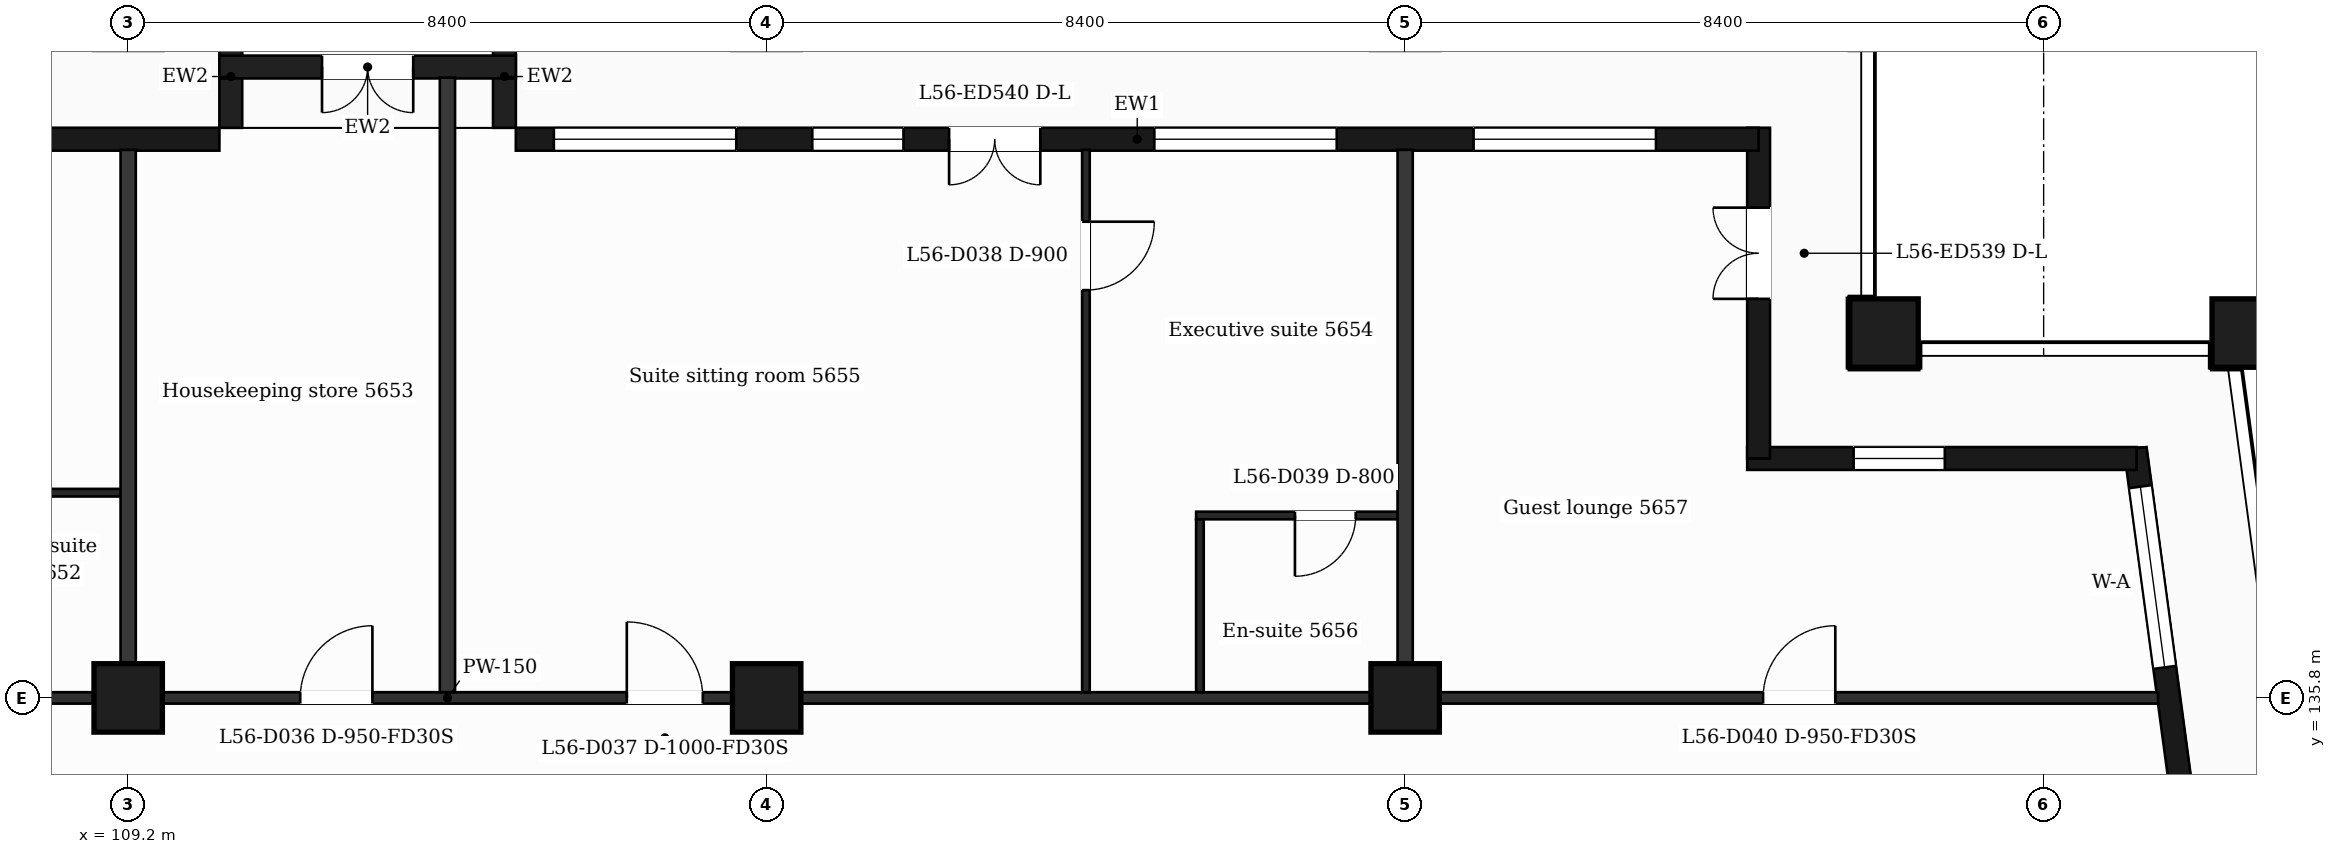
"""IFC4 building model, lengths in metres.
Left out: names, types, materials, properties, quantities, classifications, styles, units other than length and angle.
Written with IfcOpenShell. Run it as: python <this file> out.ifc"""

import sys

from ifc_helpers import new_model, si_unit, direction, frame, frame_2d, origin, origin_2d, place, context, subcontext, project, spatial, rectangle, extrude, element, fill, save


model = new_model("IFC4")
c1 = context("Model", 3, precision=1e-05, world=origin(), true_north=direction((0.0, 1.0)))
c2 = subcontext(c1, "Body", "Model", "MODEL_VIEW")
j1 = project(units=[si_unit("LENGTHUNIT", "METRE"), si_unit("PLANEANGLEUNIT", "RADIAN")], contexts=[c1])
p1 = place(None, origin())
s1 = spatial("IfcSite", under=j1, at=p1, CompositionType="ELEMENT")
p2 = place(p1, origin())
s2 = spatial("IfcBuilding", under=s1, at=p2, CompositionType="ELEMENT")
p3 = place(p2, frame((0.0, 0.0, 231.8)))
s3 = spatial("IfcBuildingStorey", under=s2, at=p3, CompositionType="ELEMENT", Elevation=231.8)
for number, where, z_axis, x_axis in (
    (1, (132.3, 140.6, 0.0), (0.0, 0.0, 1.0), (1.0, 0.0, 0.0)),
    (2, (137.065, 140.6, 0.0), (0.0, 0.0, 1.0), (1.0, 0.0, 0.0)),
    (3, (109.2, 135.8, 0.0), (0.0, 0.0, 1.0), (1.0, 0.0, 0.0)),
    (4, (117.6, 135.8, 0.0), (0.0, 0.0, 1.0), (1.0, 0.0, 0.0)),
    (5, (126.0, 135.8, 0.0), (0.0, 0.0, 1.0), (1.0, 0.0, 0.0)),
):
    element("IfcColumn", number, at=place(p3, frame(where, z_axis=z_axis, x_axis=x_axis)), inside=s3, PredefinedType="COLUMN", context=c2, shape_type="SweptSolid", body=[
        extrude(rectangle(XDim=0.9, YDim=0.9, at=origin_2d()), origin(), (0.0, 0.0, 1.0), 3.7),
    ])
p4 = place(p3, frame((136.504, 132.4, 0.0), z_axis=(0.0, 0.0, 1.0), x_axis=(-0.133399697462, 0.99106231929, 0.0)))
e6 = element("IfcWall", 6, at=p4, inside=s3, PredefinedType="SOLIDWALL", context=c2, shape_type="SweptSolid", body=[
    extrude(rectangle(XDim=6.74, YDim=0.3, at=frame_2d((3.37, 0.0))), origin(), (0.0, 0.0, 1.0), 3.38),
])
p5 = place(p4, frame((1.115, 0.0, 0.0)))
e7 = element("IfcOpeningElement", 7, at=p5, cuts=e6, PredefinedType="OPENING", context=c2, shape_type="SweptSolid", body=[
    extrude(rectangle(XDim=1.2, YDim=2.4, at=frame_2d((0.6, 1.2))), frame((0.0, 0.16, 0.0), z_axis=(0.0, -1.0, 0.0), x_axis=(1.0, 0.0, 0.0)), (0.0, 0.0, 1.0), 0.32),
])
p6 = place(p4, frame((3.835, 0.0, 0.9)))
e8 = element("IfcOpeningElement", 8, at=p6, cuts=e6, PredefinedType="OPENING", context=c2, shape_type="SweptSolid", body=[
    extrude(rectangle(XDim=2.4, YDim=2.1, at=frame_2d((1.2, 1.05))), frame((0.0, 0.16, 0.0), z_axis=(0.0, -1.0, 0.0), x_axis=(1.0, 0.0, 0.0)), (0.0, 0.0, 1.0), 0.32),
])
p7 = place(p3, frame((135.623, 138.95, 0.0), z_axis=(0.0, 0.0, 1.0), x_axis=(-1.0, 0.0, 0.0)))
e9 = element("IfcWall", 9, at=p7, inside=s3, PredefinedType="SOLIDWALL", context=c2, shape_type="SweptSolid", body=[
    extrude(rectangle(XDim=5.123, YDim=0.3, at=frame_2d((2.561, 0.0))), origin(), (0.0, 0.0, 1.0), 3.38),
])
p8 = place(p7, frame((2.523, 0.0, 0.9)))
e10 = element("IfcOpeningElement", 10, at=p8, cuts=e9, PredefinedType="OPENING", context=c2, shape_type="SweptSolid", body=[
    extrude(rectangle(XDim=1.2, YDim=2.1, at=frame_2d((0.6, 1.05))), frame((0.0, 0.16, 0.0), z_axis=(0.0, -1.0, 0.0), x_axis=(1.0, 0.0, 0.0)), (0.0, 0.0, 1.0), 0.32),
])
p9 = place(p3, frame((130.65, 138.95, 0.0), z_axis=(0.0, 0.0, 1.0), x_axis=(0.0, 1.0, 0.0)))
e11 = element("IfcWall", 11, at=p9, inside=s3, PredefinedType="SOLIDWALL", context=c2, shape_type="SweptSolid", body=[
    extrude(rectangle(XDim=4.35, YDim=0.3, at=frame_2d((2.175, 0.0))), origin(), (0.0, 0.0, 1.0), 3.38),
])
p10 = place(p9, frame((2.1, 0.0, 0.0)))
e12 = element("IfcOpeningElement", 12, at=p10, cuts=e11, PredefinedType="OPENING", context=c2, shape_type="SweptSolid", body=[
    extrude(rectangle(XDim=1.2, YDim=2.4, at=frame_2d((0.6, 1.2))), frame((0.0, 0.16, 0.0), z_axis=(0.0, -1.0, 0.0), x_axis=(1.0, 0.0, 0.0)), (0.0, 0.0, 1.0), 0.32),
])
p11 = place(p3, frame((130.65, 143.15, 0.0), z_axis=(0.0, 0.0, 1.0), x_axis=(-1.0, 0.0, 0.0)))
e13 = element("IfcWall", 13, at=p11, inside=s3, PredefinedType="SOLIDWALL", context=c2, shape_type="SweptSolid", body=[
    extrude(rectangle(XDim=16.35, YDim=0.3, at=frame_2d((8.175, 0.0))), origin(), (0.0, 0.0, 1.0), 3.38),
])
p12 = place(p11, frame((1.35, 0.0, 0.9)))
e14 = element("IfcOpeningElement", 14, at=p12, cuts=e13, PredefinedType="OPENING", context=c2, shape_type="SweptSolid", body=[
    extrude(rectangle(XDim=2.4, YDim=2.1, at=frame_2d((1.2, 1.05))), frame((0.0, 0.16, 0.0), z_axis=(0.0, -1.0, 0.0), x_axis=(1.0, 0.0, 0.0)), (0.0, 0.0, 1.0), 0.32),
])
p13 = place(p11, frame((5.55, 0.0, 0.9)))
e15 = element("IfcOpeningElement", 15, at=p13, cuts=e13, PredefinedType="OPENING", context=c2, shape_type="SweptSolid", body=[
    extrude(rectangle(XDim=2.4, YDim=2.1, at=frame_2d((1.2, 1.05))), frame((0.0, 0.16, 0.0), z_axis=(0.0, -1.0, 0.0), x_axis=(1.0, 0.0, 0.0)), (0.0, 0.0, 1.0), 0.32),
])
p14 = place(p11, frame((9.45, 0.0, 0.0)))
e16 = element("IfcOpeningElement", 16, at=p14, cuts=e13, PredefinedType="OPENING", context=c2, shape_type="SweptSolid", body=[
    extrude(rectangle(XDim=1.2, YDim=2.4, at=frame_2d((0.6, 1.2))), frame((0.0, 0.16, 0.0), z_axis=(0.0, -1.0, 0.0), x_axis=(1.0, 0.0, 0.0)), (0.0, 0.0, 1.0), 0.32),
])
p15 = place(p11, frame((11.25, 0.0, 0.9)))
e17 = element("IfcOpeningElement", 17, at=p15, cuts=e13, PredefinedType="OPENING", context=c2, shape_type="SweptSolid", body=[
    extrude(rectangle(XDim=1.2, YDim=2.1, at=frame_2d((0.6, 1.05))), frame((0.0, 0.16, 0.0), z_axis=(0.0, -1.0, 0.0), x_axis=(1.0, 0.0, 0.0)), (0.0, 0.0, 1.0), 0.32),
])
p16 = place(p11, frame((13.45, 0.0, 0.9)))
e18 = element("IfcOpeningElement", 18, at=p16, cuts=e13, PredefinedType="OPENING", context=c2, shape_type="SweptSolid", body=[
    extrude(rectangle(XDim=2.4, YDim=2.1, at=frame_2d((1.2, 1.05))), frame((0.0, 0.16, 0.0), z_axis=(0.0, -1.0, 0.0), x_axis=(1.0, 0.0, 0.0)), (0.0, 0.0, 1.0), 0.32),
])
p17 = place(p3, frame((110.4, 143.15, 0.0), z_axis=(0.0, 0.0, 1.0), x_axis=(-1.0, 0.0, 0.0)))
e19 = element("IfcWall", 19, at=p17, inside=s3, PredefinedType="SOLIDWALL", context=c2, shape_type="SweptSolid", body=[
    extrude(rectangle(XDim=14.4, YDim=0.3, at=frame_2d((7.2, 0.0))), origin(), (0.0, 0.0, 1.0), 3.38),
])
p18 = place(p17, frame((2.7, 0.0, 0.9)))
e20 = element("IfcOpeningElement", 20, at=p18, cuts=e19, PredefinedType="OPENING", context=c2, shape_type="SweptSolid", body=[
    extrude(rectangle(XDim=1.2, YDim=2.1, at=frame_2d((0.6, 1.05))), frame((0.0, 0.16, 0.0), z_axis=(0.0, -1.0, 0.0), x_axis=(1.0, 0.0, 0.0)), (0.0, 0.0, 1.0), 0.32),
])
p19 = place(p17, frame((6.9, 0.0, 0.0)))
e21 = element("IfcOpeningElement", 21, at=p19, cuts=e19, PredefinedType="OPENING", context=c2, shape_type="SweptSolid", body=[
    extrude(rectangle(XDim=1.2, YDim=2.4, at=frame_2d((0.6, 1.2))), frame((0.0, 0.16, 0.0), z_axis=(0.0, -1.0, 0.0), x_axis=(1.0, 0.0, 0.0)), (0.0, 0.0, 1.0), 0.32),
])
p20 = place(p17, frame((10.5, 0.0, 0.9)))
e22 = element("IfcOpeningElement", 22, at=p20, cuts=e19, PredefinedType="OPENING", context=c2, shape_type="SweptSolid", body=[
    extrude(rectangle(XDim=2.4, YDim=2.1, at=frame_2d((1.2, 1.05))), frame((0.0, 0.16, 0.0), z_axis=(0.0, -1.0, 0.0), x_axis=(1.0, 0.0, 0.0)), (0.0, 0.0, 1.0), 0.32),
])
for number, where, z_axis, x_axis in (
    (23, (114.15, 143.3, 0.0), (0.0, 0.0, 1.0), (0.0, 1.0, 0.0)),
    (24, (110.55, 143.3, 0.0), (0.0, 0.0, 1.0), (0.0, 1.0, 0.0)),
):
    element("IfcWall", number, at=place(p3, frame(where, z_axis=z_axis, x_axis=x_axis)), inside=s3, PredefinedType="SOLIDWALL", context=c2, shape_type="SweptSolid", body=[
        extrude(rectangle(XDim=1.35, YDim=0.3, at=frame_2d((0.675, 0.0))), origin(), (0.0, 0.0, 1.0), 3.38),
    ])
p21 = place(p3, frame((114.3, 144.1, 0.0), z_axis=(0.0, 0.0, 1.0), x_axis=(-1.0, 0.0, 0.0)))
e25 = element("IfcWall", 25, at=p21, inside=s3, PredefinedType="SOLIDWALL", context=c2, shape_type="SweptSolid", body=[
    extrude(rectangle(XDim=3.9, YDim=0.3, at=frame_2d((1.95, 0.0))), origin(), (0.0, 0.0, 1.0), 3.38),
])
p22 = place(p21, frame((1.35, 0.0, 0.0)))
e26 = element("IfcOpeningElement", 26, at=p22, cuts=e25, PredefinedType="OPENING", context=c2, shape_type="SweptSolid", body=[
    extrude(rectangle(XDim=1.2, YDim=2.4, at=frame_2d((0.6, 1.2))), frame((0.0, 0.16, 0.0), z_axis=(0.0, -1.0, 0.0), x_axis=(1.0, 0.0, 0.0)), (0.0, 0.0, 1.0), 0.32),
])
p23 = place(p3, frame((90.895, 135.8, 0.0), z_axis=(0.0, 0.0, 1.0), x_axis=(1.0, 0.0, 0.0)))
e27 = element("IfcWall", 27, at=p23, inside=s3, PredefinedType="PARTITIONING", context=c2, shape_type="SweptSolid", body=[
    extrude(rectangle(XDim=45.011, YDim=0.15, at=frame_2d((22.505, 0.0))), origin(), (0.0, 0.0, 1.0), 3.38),
])
p24 = place(p23, frame((7.675, 0.0, 0.0)))
e28 = element("IfcOpeningElement", 28, at=p24, cuts=e27, PredefinedType="OPENING", context=c2, shape_type="SweptSolid", body=[
    extrude(rectangle(XDim=1.0, YDim=2.1, at=frame_2d((0.5, 1.05))), frame((0.0, 0.085, 0.0), z_axis=(0.0, -1.0, 0.0), x_axis=(1.0, 0.0, 0.0)), (0.0, 0.0, 1.0), 0.17),
])
p25 = place(p23, frame((12.58, 0.0, 0.0)))
e29 = element("IfcOpeningElement", 29, at=p25, cuts=e27, PredefinedType="OPENING", context=c2, shape_type="SweptSolid", body=[
    extrude(rectangle(XDim=0.95, YDim=2.1, at=frame_2d((0.475, 1.05))), frame((0.0, 0.085, 0.0), z_axis=(0.0, -1.0, 0.0), x_axis=(1.0, 0.0, 0.0)), (0.0, 0.0, 1.0), 0.17),
])
p26 = place(p23, frame((20.568, 0.0, 0.0)))
e30 = element("IfcOpeningElement", 30, at=p26, cuts=e27, PredefinedType="OPENING", context=c2, shape_type="SweptSolid", body=[
    extrude(rectangle(XDim=0.95, YDim=2.1, at=frame_2d((0.475, 1.05))), frame((0.0, 0.085, 0.0), z_axis=(0.0, -1.0, 0.0), x_axis=(1.0, 0.0, 0.0)), (0.0, 0.0, 1.0), 0.17),
])
p27 = place(p23, frame((24.865, 0.0, 0.0)))
e31 = element("IfcOpeningElement", 31, at=p27, cuts=e27, PredefinedType="OPENING", context=c2, shape_type="SweptSolid", body=[
    extrude(rectangle(XDim=1.0, YDim=2.1, at=frame_2d((0.5, 1.05))), frame((0.0, 0.085, 0.0), z_axis=(0.0, -1.0, 0.0), x_axis=(1.0, 0.0, 0.0)), (0.0, 0.0, 1.0), 0.17),
])
p28 = place(p23, frame((39.814, 0.0, 0.0)))
e32 = element("IfcOpeningElement", 32, at=p28, cuts=e27, PredefinedType="OPENING", context=c2, shape_type="SweptSolid", body=[
    extrude(rectangle(XDim=0.95, YDim=2.1, at=frame_2d((0.475, 1.05))), frame((0.0, 0.085, 0.0), z_axis=(0.0, -1.0, 0.0), x_axis=(1.0, 0.0, 0.0)), (0.0, 0.0, 1.0), 0.17),
])
p29 = place(p3, frame((123.25, 138.2, 0.0), z_axis=(0.0, 0.0, 1.0), x_axis=(1.0, 0.0, 0.0)))
e33 = element("IfcWall", 33, at=p29, inside=s3, PredefinedType="PARTITIONING", context=c2, shape_type="SweptSolid", body=[
    extrude(rectangle(XDim=2.75, YDim=0.1, at=frame_2d((1.375, 0.0))), origin(), (0.0, 0.0, 1.0), 3.38),
])
p30 = place(p29, frame((1.3, 0.0, 0.0)))
e34 = element("IfcOpeningElement", 34, at=p30, cuts=e33, PredefinedType="OPENING", context=c2, shape_type="SweptSolid", body=[
    extrude(rectangle(XDim=0.8, YDim=2.1, at=frame_2d((0.4, 1.05))), frame((0.0, 0.06, 0.0), z_axis=(0.0, -1.0, 0.0), x_axis=(1.0, 0.0, 0.0)), (0.0, 0.0, 1.0), 0.12),
])
p31 = place(p3, frame((107.05, 138.5, 0.0), z_axis=(0.0, 0.0, 1.0), x_axis=(1.0, 0.0, 0.0)))
e35 = element("IfcWall", 35, at=p31, inside=s3, PredefinedType="PARTITIONING", context=c2, shape_type="SweptSolid", body=[
    extrude(rectangle(XDim=2.15, YDim=0.1, at=frame_2d((1.075, 0.0))), origin(), (0.0, 0.0, 1.0), 3.38),
])
p32 = place(p3, frame((109.2, 135.875, 0.0), z_axis=(0.0, 0.0, 1.0), x_axis=(0.0, 1.0, 0.0)))
e36 = element("IfcWall", 36, at=p32, inside=s3, PredefinedType="PARTITIONING", context=c2, shape_type="SweptSolid", body=[
    extrude(rectangle(XDim=7.135, YDim=0.2, at=frame_2d((3.567, 0.0))), origin(), (0.0, 0.0, 1.0), 3.38),
])
p33 = place(p3, frame((113.4, 135.875, 0.0), z_axis=(0.0, 0.0, 1.0), x_axis=(0.0, 1.0, 0.0)))
e37 = element("IfcWall", 37, at=p33, inside=s3, PredefinedType="PARTITIONING", context=c2, shape_type="SweptSolid", body=[
    extrude(rectangle(XDim=8.085, YDim=0.2, at=frame_2d((4.042, 0.0))), origin(), (0.0, 0.0, 1.0), 3.38),
])
p34 = place(p3, frame((121.8, 135.875, 0.0), z_axis=(0.0, 0.0, 1.0), x_axis=(0.0, 1.0, 0.0)))
e38 = element("IfcWall", 38, at=p34, inside=s3, PredefinedType="PARTITIONING", context=c2, shape_type="SweptSolid", body=[
    extrude(rectangle(XDim=7.135, YDim=0.1, at=frame_2d((3.567, 0.0))), origin(), (0.0, 0.0, 1.0), 3.38),
])
p35 = place(p34, frame((5.29, 0.0, 0.0)))
e39 = element("IfcOpeningElement", 39, at=p35, cuts=e38, PredefinedType="OPENING", context=c2, shape_type="SweptSolid", body=[
    extrude(rectangle(XDim=0.9, YDim=2.1, at=frame_2d((0.45, 1.05))), frame((0.0, 0.06, 0.0), z_axis=(0.0, -1.0, 0.0), x_axis=(1.0, 0.0, 0.0)), (0.0, 0.0, 1.0), 0.12),
])
p36 = place(p3, frame((123.3, 135.875, 0.0), z_axis=(0.0, 0.0, 1.0), x_axis=(0.0, 1.0, 0.0)))
e40 = element("IfcWall", 40, at=p36, inside=s3, PredefinedType="PARTITIONING", context=c2, shape_type="SweptSolid", body=[
    extrude(rectangle(XDim=2.275, YDim=0.1, at=frame_2d((1.137, 0.0))), origin(), (0.0, 0.0, 1.0), 3.38),
])
p37 = place(p3, frame((126.0, 135.875, 0.0), z_axis=(0.0, 0.0, 1.0), x_axis=(0.0, 1.0, 0.0)))
e41 = element("IfcWall", 41, at=p37, inside=s3, PredefinedType="PARTITIONING", context=c2, shape_type="SweptSolid", body=[
    extrude(rectangle(XDim=7.135, YDim=0.2, at=frame_2d((3.567, 0.0))), origin(), (0.0, 0.0, 1.0), 3.38),
])
p38 = place(p6, origin())
e42 = element("IfcWindow", 42, at=p38, inside=s3, PartitioningType="SINGLE_PANEL", PredefinedType="WINDOW", context=c2, shape_type="SweptSolid", body=[
    extrude(rectangle(XDim=2.4, YDim=2.1, at=frame_2d((1.2, 1.05))), frame((0.0, 0.03, 0.0), z_axis=(0.0, -1.0, 0.0), x_axis=(1.0, 0.0, 0.0)), (0.0, 0.0, 1.0), 0.06),
])
fill(e8, e42)
p39 = place(p8, origin())
e43 = element("IfcWindow", 43, at=p39, inside=s3, PartitioningType="SINGLE_PANEL", PredefinedType="WINDOW", context=c2, shape_type="SweptSolid", body=[
    extrude(rectangle(XDim=1.2, YDim=2.1, at=frame_2d((0.6, 1.05))), frame((0.0, 0.03, 0.0), z_axis=(0.0, -1.0, 0.0), x_axis=(1.0, 0.0, 0.0)), (0.0, 0.0, 1.0), 0.06),
])
fill(e10, e43)
p40 = place(p10, origin())
e44 = element("IfcDoor", 44, at=p40, inside=s3, OperationType="DOUBLE_DOOR_SINGLE_SWING", PredefinedType="DOOR", context=c2, shape_type="SweptSolid", body=[
    extrude(rectangle(XDim=1.2, YDim=2.4, at=frame_2d((0.6, 1.2))), frame((0.0, 0.025, 0.0), z_axis=(0.0, -1.0, 0.0), x_axis=(1.0, 0.0, 0.0)), (0.0, 0.0, 1.0), 0.05),
])
fill(e12, e44)
p41 = place(p12, origin())
e45 = element("IfcWindow", 45, at=p41, inside=s3, PartitioningType="SINGLE_PANEL", PredefinedType="WINDOW", context=c2, shape_type="SweptSolid", body=[
    extrude(rectangle(XDim=2.4, YDim=2.1, at=frame_2d((1.2, 1.05))), frame((0.0, 0.03, 0.0), z_axis=(0.0, -1.0, 0.0), x_axis=(1.0, 0.0, 0.0)), (0.0, 0.0, 1.0), 0.06),
])
fill(e14, e45)
p42 = place(p13, origin())
e46 = element("IfcWindow", 46, at=p42, inside=s3, PartitioningType="SINGLE_PANEL", PredefinedType="WINDOW", context=c2, shape_type="SweptSolid", body=[
    extrude(rectangle(XDim=2.4, YDim=2.1, at=frame_2d((1.2, 1.05))), frame((0.0, 0.03, 0.0), z_axis=(0.0, -1.0, 0.0), x_axis=(1.0, 0.0, 0.0)), (0.0, 0.0, 1.0), 0.06),
])
fill(e15, e46)
p43 = place(p14, origin())
e47 = element("IfcDoor", 47, at=p43, inside=s3, OperationType="DOUBLE_DOOR_SINGLE_SWING", PredefinedType="DOOR", context=c2, shape_type="SweptSolid", body=[
    extrude(rectangle(XDim=1.2, YDim=2.4, at=frame_2d((0.6, 1.2))), frame((0.0, 0.025, 0.0), z_axis=(0.0, -1.0, 0.0), x_axis=(1.0, 0.0, 0.0)), (0.0, 0.0, 1.0), 0.05),
])
fill(e16, e47)
p44 = place(p15, origin())
e48 = element("IfcWindow", 48, at=p44, inside=s3, PartitioningType="SINGLE_PANEL", PredefinedType="WINDOW", context=c2, shape_type="SweptSolid", body=[
    extrude(rectangle(XDim=1.2, YDim=2.1, at=frame_2d((0.6, 1.05))), frame((0.0, 0.03, 0.0), z_axis=(0.0, -1.0, 0.0), x_axis=(1.0, 0.0, 0.0)), (0.0, 0.0, 1.0), 0.06),
])
fill(e17, e48)
p45 = place(p16, origin())
e49 = element("IfcWindow", 49, at=p45, inside=s3, PartitioningType="SINGLE_PANEL", PredefinedType="WINDOW", context=c2, shape_type="SweptSolid", body=[
    extrude(rectangle(XDim=2.4, YDim=2.1, at=frame_2d((1.2, 1.05))), frame((0.0, 0.03, 0.0), z_axis=(0.0, -1.0, 0.0), x_axis=(1.0, 0.0, 0.0)), (0.0, 0.0, 1.0), 0.06),
])
fill(e18, e49)
p46 = place(p22, origin())
e50 = element("IfcDoor", 50, at=p46, inside=s3, OperationType="DOUBLE_DOOR_SINGLE_SWING", PredefinedType="DOOR", context=c2, shape_type="SweptSolid", body=[
    extrude(rectangle(XDim=1.2, YDim=2.4, at=frame_2d((0.6, 1.2))), frame((0.0, 0.025, 0.0), z_axis=(0.0, -1.0, 0.0), x_axis=(1.0, 0.0, 0.0)), (0.0, 0.0, 1.0), 0.05),
])
fill(e26, e50)
p47 = place(p26, origin())
e51 = element("IfcDoor", 51, at=p47, inside=s3, OperationType="SINGLE_SWING_RIGHT", PredefinedType="DOOR", context=c2, shape_type="SweptSolid", body=[
    extrude(rectangle(XDim=0.95, YDim=2.1, at=frame_2d((0.475, 1.05))), frame((0.0, 0.025, 0.0), z_axis=(0.0, -1.0, 0.0), x_axis=(1.0, 0.0, 0.0)), (0.0, 0.0, 1.0), 0.05),
])
fill(e30, e51)
p48 = place(p27, origin())
e52 = element("IfcDoor", 52, at=p48, inside=s3, OperationType="SINGLE_SWING_LEFT", PredefinedType="DOOR", context=c2, shape_type="SweptSolid", body=[
    extrude(rectangle(XDim=1.0, YDim=2.1, at=frame_2d((0.5, 1.05))), frame((0.0, 0.025, 0.0), z_axis=(0.0, -1.0, 0.0), x_axis=(1.0, 0.0, 0.0)), (0.0, 0.0, 1.0), 0.05),
])
fill(e31, e52)
p49 = place(p35, origin())
e53 = element("IfcDoor", 53, at=p49, inside=s3, OperationType="SINGLE_SWING_RIGHT", PredefinedType="DOOR", context=c2, shape_type="SweptSolid", body=[
    extrude(rectangle(XDim=0.9, YDim=2.1, at=frame_2d((0.45, 1.05))), frame((0.0, 0.025, 0.0), z_axis=(0.0, -1.0, 0.0), x_axis=(1.0, 0.0, 0.0)), (0.0, 0.0, 1.0), 0.05),
])
fill(e39, e53)
p50 = place(p30, origin())
e54 = element("IfcDoor", 54, at=p50, inside=s3, OperationType="SINGLE_SWING_LEFT", PredefinedType="DOOR", context=c2, shape_type="SweptSolid", body=[
    extrude(rectangle(XDim=0.8, YDim=2.1, at=frame_2d((0.4, 1.05))), frame((0.0, 0.025, 0.0), z_axis=(0.0, -1.0, 0.0), x_axis=(1.0, 0.0, 0.0)), (0.0, 0.0, 1.0), 0.05),
])
fill(e34, e54)
p51 = place(p28, origin())
e55 = element("IfcDoor", 55, at=p51, inside=s3, OperationType="SINGLE_SWING_RIGHT", PredefinedType="DOOR", context=c2, shape_type="SweptSolid", body=[
    extrude(rectangle(XDim=0.95, YDim=2.1, at=frame_2d((0.475, 1.05))), frame((0.0, 0.025, 0.0), z_axis=(0.0, -1.0, 0.0), x_axis=(1.0, 0.0, 0.0)), (0.0, 0.0, 1.0), 0.05),
])
fill(e32, e55)
save(model, sys.argv[1])
